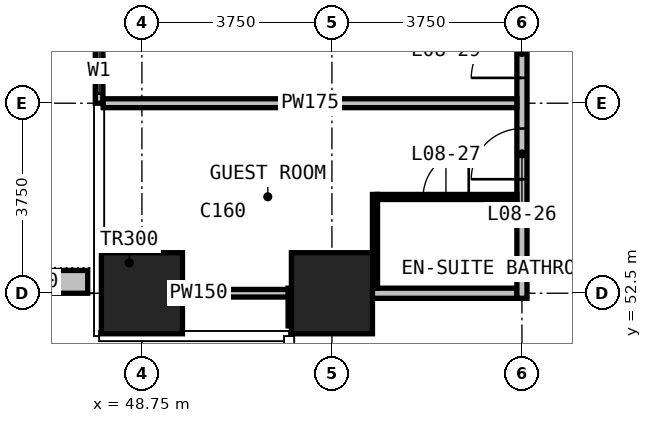
"""IFC4 building model, lengths in metres.
Left out: names, types, materials, properties, quantities, classifications, styles, units other than length and angle.
Written with IfcOpenShell. Run it as: python <this file> out.ifc"""

import sys

from ifc_helpers import new_model, si_unit, direction, frame, frame_2d, origin, origin_2d, place, context, subcontext, project, spatial, rectangle, extrude, element, fill, save


model = new_model("IFC4")
c1 = context("Model", 3, precision=1e-05, world=origin(), true_north=direction((0.0, 1.0)))
c2 = subcontext(c1, "Body", "Model", "MODEL_VIEW")
j1 = project(units=[si_unit("LENGTHUNIT", "METRE"), si_unit("PLANEANGLEUNIT", "RADIAN")], contexts=[c1])
p1 = place(None, origin())
s1 = spatial("IfcSite", under=j1, at=p1, CompositionType="ELEMENT")
p2 = place(p1, origin())
s2 = spatial("IfcBuilding", under=s1, at=p2, CompositionType="ELEMENT")
p3 = place(p2, frame((0.0, 0.0, 46.1)))
s3 = spatial("IfcBuildingStorey", under=s2, at=p3, CompositionType="ELEMENT", Elevation=46.1)
for number, where, z_axis, x_axis in (
    (1, (48.75, 52.5, 0.0), (0.0, 0.0, 1.0), (1.0, 0.0, 0.0)),
    (2, (52.5, 52.5, 0.0), (0.0, 0.0, 1.0), (1.0, 0.0, 0.0)),
):
    element("IfcColumn", number, at=place(p3, frame(where, z_axis=z_axis, x_axis=x_axis)), inside=s3, PredefinedType="COLUMN", context=c2, shape_type="SweptSolid", body=[
        extrude(rectangle(XDim=1.6, YDim=1.6, at=origin_2d()), origin(), (0.0, 0.0, 1.0), 3.3),
    ])
p4 = place(p3, frame((47.905, 56.25, 0.0), z_axis=(0.0, 0.0, 1.0), x_axis=(0.0, 1.0, 0.0)))
e3 = element("IfcWall", 3, at=p4, inside=s3, PredefinedType="SOLIDWALL", context=c2, shape_type="SweptSolid", body=[
    extrude(rectangle(XDim=3.75, YDim=0.15, at=frame_2d((1.875, 0.0))), origin(), (0.0, 0.0, 1.0), 3.0),
])
p5 = place(p4, frame((0.188, 0.0, 0.1)))
e4 = element("IfcOpeningElement", 4, at=p5, cuts=e3, PredefinedType="OPENING", context=c2, shape_type="SweptSolid", body=[
    extrude(rectangle(XDim=0.9, YDim=2.4, at=frame_2d((0.45, 1.2))), frame((0.0, 0.085, 0.0), z_axis=(0.0, -1.0, 0.0), x_axis=(1.0, 0.0, 0.0)), (0.0, 0.0, 1.0), 0.17),
])
p6 = place(p4, frame((1.275, 0.0, 0.0)))
e5 = element("IfcOpeningElement", 5, at=p6, cuts=e3, PredefinedType="OPENING", context=c2, shape_type="SweptSolid", body=[
    extrude(rectangle(XDim=1.2, YDim=2.4, at=frame_2d((0.6, 1.2))), frame((0.0, 0.085, 0.0), z_axis=(0.0, -1.0, 0.0), x_axis=(1.0, 0.0, 0.0)), (0.0, 0.0, 1.0), 0.17),
])
p7 = place(p3, frame((47.68, 52.725, 0.0), z_axis=(0.0, 0.0, 1.0), x_axis=(-1.0, 0.0, 0.0)))
e6 = element("IfcWall", 6, at=p7, inside=s3, PredefinedType="USERDEFINED", context=c2, shape_type="SweptSolid", body=[
    extrude(rectangle(XDim=2.33, YDim=0.45, at=frame_2d((1.165, 0.0))), origin(), (0.0, 0.0, 1.0), 1.1),
])
p8 = place(p3, frame((51.835, 52.5, 0.0), z_axis=(0.0, 0.0, 1.0), x_axis=(1.0, 0.0, 0.0)))
e7 = element("IfcWall", 7, at=p8, inside=s3, PredefinedType="PARTITIONING", context=c2, shape_type="SweptSolid", body=[
    extrude(rectangle(XDim=4.315, YDim=0.2, at=frame_2d((2.157, 0.0))), origin(), (0.0, 0.0, 1.0), 3.0),
])
p9 = place(p3, frame((51.735, 51.855, 0.0), z_axis=(0.0, 0.0, 1.0), x_axis=(0.0, 1.0, 0.0)))
e8 = element("IfcWall", 8, at=p9, inside=s3, PredefinedType="PARTITIONING", context=c2, shape_type="SweptSolid", body=[
    extrude(rectangle(XDim=0.745, YDim=0.2, at=frame_2d((0.373, 0.0))), origin(), (0.0, 0.0, 1.0), 3.0),
])
p10 = place(p3, frame((56.25, 52.4, 0.0), z_axis=(0.0, 0.0, 1.0), x_axis=(0.0, 1.0, 0.0)))
e9 = element("IfcWall", 9, at=p10, inside=s3, PredefinedType="PARTITIONING", context=c2, shape_type="SweptSolid", body=[
    extrude(rectangle(XDim=33.925, YDim=0.2, at=frame_2d((16.962, 0.0))), origin(), (0.0, 0.0, 1.0), 3.0),
])
p11 = place(p10, frame((2.35, 0.0, 0.0)))
e10 = element("IfcOpeningElement", 10, at=p11, cuts=e9, PredefinedType="OPENING", context=c2, shape_type="SweptSolid", body=[
    extrude(rectangle(XDim=1.0, YDim=2.2, at=frame_2d((0.5, 1.1))), frame((0.0, 0.11, 0.0), z_axis=(0.0, -1.0, 0.0), x_axis=(1.0, 0.0, 0.0)), (0.0, 0.0, 1.0), 0.22),
])
p12 = place(p10, frame((4.35, 0.0, 0.0)))
e11 = element("IfcOpeningElement", 11, at=p12, cuts=e9, PredefinedType="OPENING", context=c2, shape_type="SweptSolid", body=[
    extrude(rectangle(XDim=1.0, YDim=2.2, at=frame_2d((0.5, 1.1))), frame((0.0, 0.11, 0.0), z_axis=(0.0, -1.0, 0.0), x_axis=(1.0, 0.0, 0.0)), (0.0, 0.0, 1.0), 0.22),
])
p13 = place(p10, frame((9.85, 0.0, 0.0)))
e12 = element("IfcOpeningElement", 12, at=p13, cuts=e9, PredefinedType="OPENING", context=c2, shape_type="SweptSolid", body=[
    extrude(rectangle(XDim=1.0, YDim=2.2, at=frame_2d((0.5, 1.1))), frame((0.0, 0.11, 0.0), z_axis=(0.0, -1.0, 0.0), x_axis=(1.0, 0.0, 0.0)), (0.0, 0.0, 1.0), 0.22),
])
p14 = place(p10, frame((11.85, 0.0, 0.0)))
e13 = element("IfcOpeningElement", 13, at=p14, cuts=e9, PredefinedType="OPENING", context=c2, shape_type="SweptSolid", body=[
    extrude(rectangle(XDim=1.0, YDim=2.2, at=frame_2d((0.5, 1.1))), frame((0.0, 0.11, 0.0), z_axis=(0.0, -1.0, 0.0), x_axis=(1.0, 0.0, 0.0)), (0.0, 0.0, 1.0), 0.22),
])
p15 = place(p10, frame((17.35, 0.0, 0.0)))
e14 = element("IfcOpeningElement", 14, at=p15, cuts=e9, PredefinedType="OPENING", context=c2, shape_type="SweptSolid", body=[
    extrude(rectangle(XDim=1.0, YDim=2.2, at=frame_2d((0.5, 1.1))), frame((0.0, 0.11, 0.0), z_axis=(0.0, -1.0, 0.0), x_axis=(1.0, 0.0, 0.0)), (0.0, 0.0, 1.0), 0.22),
])
p16 = place(p10, frame((19.35, 0.0, 0.0)))
e15 = element("IfcOpeningElement", 15, at=p16, cuts=e9, PredefinedType="OPENING", context=c2, shape_type="SweptSolid", body=[
    extrude(rectangle(XDim=1.0, YDim=2.2, at=frame_2d((0.5, 1.1))), frame((0.0, 0.11, 0.0), z_axis=(0.0, -1.0, 0.0), x_axis=(1.0, 0.0, 0.0)), (0.0, 0.0, 1.0), 0.22),
])
p17 = place(p10, frame((24.85, 0.0, 0.0)))
e16 = element("IfcOpeningElement", 16, at=p17, cuts=e9, PredefinedType="OPENING", context=c2, shape_type="SweptSolid", body=[
    extrude(rectangle(XDim=1.0, YDim=2.2, at=frame_2d((0.5, 1.1))), frame((0.0, 0.11, 0.0), z_axis=(0.0, -1.0, 0.0), x_axis=(1.0, 0.0, 0.0)), (0.0, 0.0, 1.0), 0.22),
])
p18 = place(p10, frame((26.85, 0.0, 0.0)))
e17 = element("IfcOpeningElement", 17, at=p18, cuts=e9, PredefinedType="OPENING", context=c2, shape_type="SweptSolid", body=[
    extrude(rectangle(XDim=1.0, YDim=2.2, at=frame_2d((0.5, 1.1))), frame((0.0, 0.11, 0.0), z_axis=(0.0, -1.0, 0.0), x_axis=(1.0, 0.0, 0.0)), (0.0, 0.0, 1.0), 0.22),
])
p19 = place(p10, frame((31.55, 0.0, 0.0)))
e18 = element("IfcOpeningElement", 18, at=p19, cuts=e9, PredefinedType="OPENING", context=c2, shape_type="SweptSolid", body=[
    extrude(rectangle(XDim=0.9, YDim=2.2, at=frame_2d((0.45, 1.1))), frame((0.0, 0.11, 0.0), z_axis=(0.0, -1.0, 0.0), x_axis=(1.0, 0.0, 0.0)), (0.0, 0.0, 1.0), 0.22),
])
p20 = place(p3, frame((47.985, 56.25, 0.0), z_axis=(0.0, 0.0, 1.0), x_axis=(1.0, 0.0, 0.0)))
e19 = element("IfcWall", 19, at=p20, inside=s3, PredefinedType="PARTITIONING", context=c2, shape_type="SweptSolid", body=[
    extrude(rectangle(XDim=8.165, YDim=0.175, at=frame_2d((4.083, 0.0))), origin(), (0.0, 0.0, 1.0), 3.0),
])
p21 = place(p3, frame((48.105, 52.5, 0.0), z_axis=(0.0, 0.0, 1.0), x_axis=(1.0, 0.0, 0.0)))
e20 = element("IfcWall", 20, at=p21, inside=s3, PredefinedType="PARTITIONING", context=c2, shape_type="SweptSolid", body=[
    extrude(rectangle(XDim=3.53, YDim=0.15, at=frame_2d((1.765, 0.0))), origin(), (0.0, 0.0, 1.0), 3.0),
])
p22 = place(p3, frame((53.4, 54.4, 0.0), z_axis=(0.0, 0.0, 1.0), x_axis=(1.0, 0.0, 0.0)))
e21 = element("IfcWall", 21, at=p22, inside=s3, PredefinedType="PARTITIONING", context=c2, shape_type="SweptSolid", body=[
    extrude(rectangle(XDim=2.75, YDim=0.1, at=frame_2d((1.375, 0.0))), origin(), (0.0, 0.0, 1.0), 3.0),
])
p23 = place(p22, frame((0.9, 0.0, 0.0)))
e22 = element("IfcOpeningElement", 22, at=p23, cuts=e21, PredefinedType="OPENING", context=c2, shape_type="SweptSolid", body=[
    extrude(rectangle(XDim=0.9, YDim=2.2, at=frame_2d((0.45, 1.1))), frame((0.0, 0.06, 0.0), z_axis=(0.0, -1.0, 0.0), x_axis=(1.0, 0.0, 0.0)), (0.0, 0.0, 1.0), 0.12),
])
p24 = place(p3, frame((53.35, 52.6, 0.0), z_axis=(0.0, 0.0, 1.0), x_axis=(0.0, 1.0, 0.0)))
e23 = element("IfcWall", 23, at=p24, inside=s3, PredefinedType="PARTITIONING", context=c2, shape_type="SweptSolid", body=[
    extrude(rectangle(XDim=1.85, YDim=0.1, at=frame_2d((0.925, 0.0))), origin(), (0.0, 0.0, 1.0), 3.0),
])
p25 = place(p5, origin())
e24 = element("IfcWindow", 24, at=p25, inside=s3, PartitioningType="SINGLE_PANEL", PredefinedType="WINDOW", context=c2, shape_type="SweptSolid", body=[
    extrude(rectangle(XDim=0.9, YDim=2.4, at=frame_2d((0.45, 1.2))), frame((0.0, 0.03, 0.0), z_axis=(0.0, -1.0, 0.0), x_axis=(1.0, 0.0, 0.0)), (0.0, 0.0, 1.0), 0.06),
])
fill(e4, e24)
p26 = place(p11, origin())
e25 = element("IfcDoor", 25, at=p26, inside=s3, OperationType="SINGLE_SWING_LEFT", PredefinedType="DOOR", context=c2, shape_type="SweptSolid", body=[
    extrude(rectangle(XDim=1.0, YDim=2.2, at=frame_2d((0.5, 1.1))), frame((0.0, 0.025, 0.0), z_axis=(0.0, -1.0, 0.0), x_axis=(1.0, 0.0, 0.0)), (0.0, 0.0, 1.0), 0.05),
])
fill(e10, e25)
p27 = place(p23, origin())
e26 = element("IfcDoor", 26, at=p27, inside=s3, OperationType="SINGLE_SWING_RIGHT", PredefinedType="DOOR", context=c2, shape_type="SweptSolid", body=[
    extrude(rectangle(XDim=0.9, YDim=2.2, at=frame_2d((0.45, 1.1))), frame((0.0, 0.025, 0.0), z_axis=(0.0, -1.0, 0.0), x_axis=(1.0, 0.0, 0.0)), (0.0, 0.0, 1.0), 0.05),
])
fill(e22, e26)
p28 = place(p12, origin())
e27 = element("IfcDoor", 27, at=p28, inside=s3, OperationType="SINGLE_SWING_LEFT", PredefinedType="DOOR", context=c2, shape_type="SweptSolid", body=[
    extrude(rectangle(XDim=1.0, YDim=2.2, at=frame_2d((0.5, 1.1))), frame((0.0, 0.025, 0.0), z_axis=(0.0, -1.0, 0.0), x_axis=(1.0, 0.0, 0.0)), (0.0, 0.0, 1.0), 0.05),
])
fill(e11, e27)
save(model, sys.argv[1])
